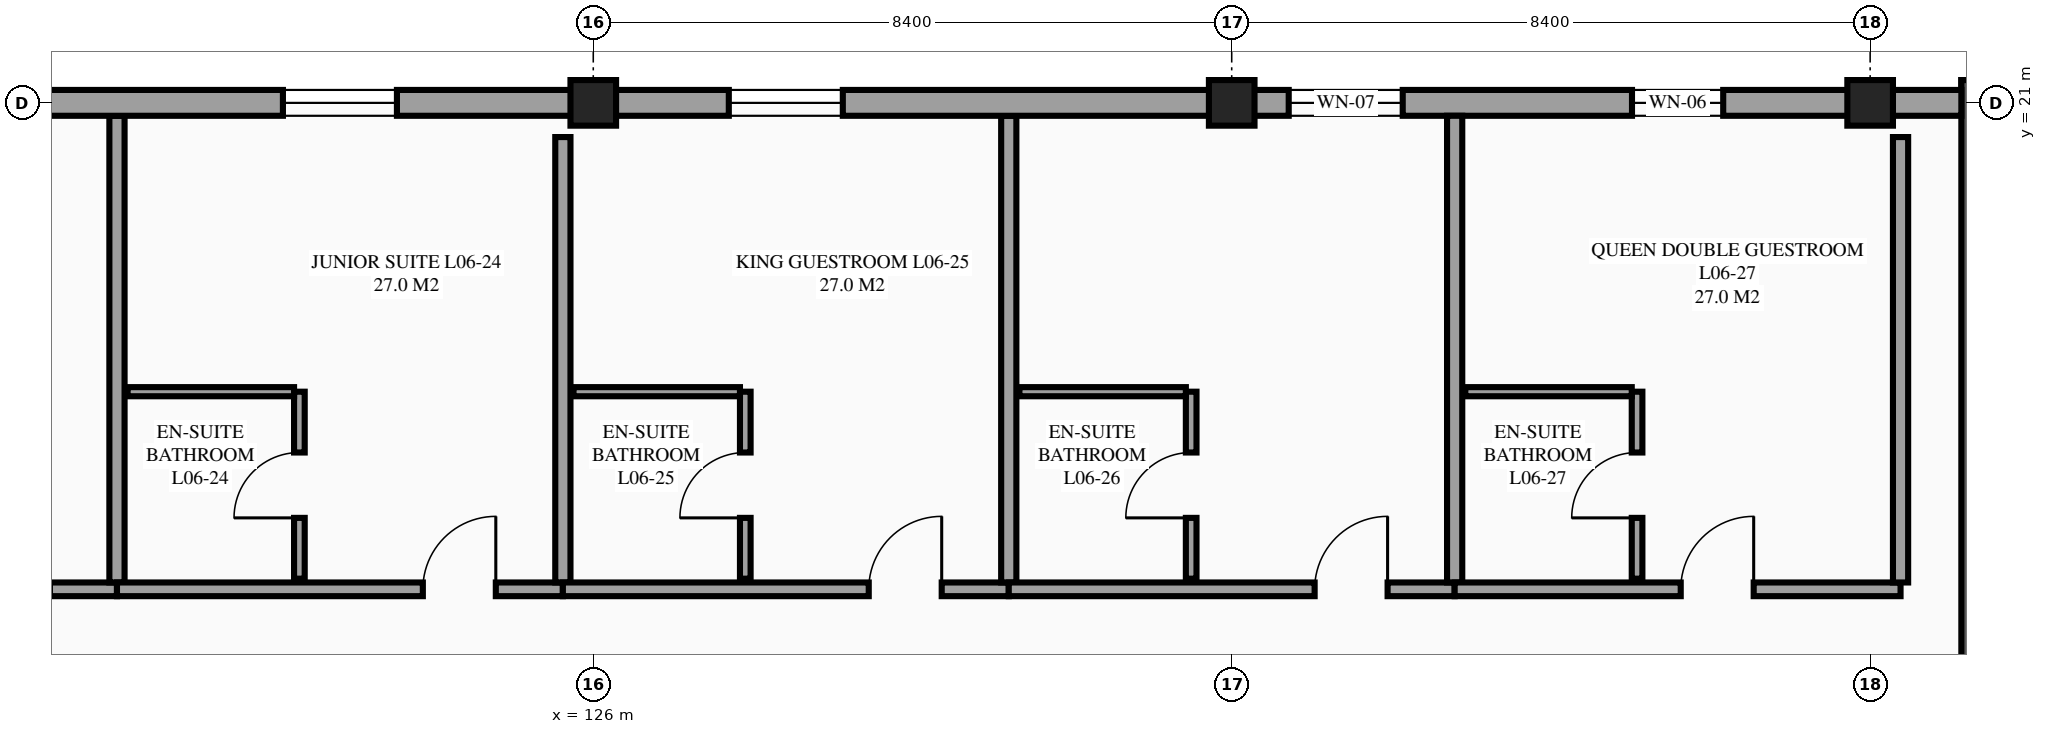
"""IFC4 building model, lengths in metres.
Left out: names, types, materials, properties, quantities, classifications, styles, units other than length and angle.
Written with IfcOpenShell. Run it as: python <this file> out.ifc"""

import sys

from ifc_helpers import new_model, si_unit, direction, frame, frame_2d, origin, origin_2d, place, context, subcontext, project, spatial, rectangle, extrude, element, fill, save


model = new_model("IFC4")
c1 = context("Model", 3, precision=1e-05, world=origin(), true_north=direction((0.0, 1.0)))
c2 = subcontext(c1, "Body", "Model", "MODEL_VIEW")
j1 = project(units=[si_unit("LENGTHUNIT", "METRE"), si_unit("PLANEANGLEUNIT", "RADIAN")], contexts=[c1])
p1 = place(None, origin())
s1 = spatial("IfcSite", under=j1, at=p1, CompositionType="ELEMENT")
p2 = place(p1, origin())
s2 = spatial("IfcBuilding", under=s1, at=p2, CompositionType="ELEMENT")
p3 = place(p2, frame((0.0, 0.0, 25.5)))
s3 = spatial("IfcBuildingStorey", under=s2, at=p3, CompositionType="ELEMENT", Elevation=25.5)
for number, where, z_axis, x_axis in (
    (1, (126.0, 21.0, 0.0), (0.0, 0.0, 1.0), (1.0, 0.0, 0.0)),
    (2, (134.4, 21.0, 0.0), (0.0, 0.0, 1.0), (1.0, 0.0, 0.0)),
    (3, (142.8, 21.0, 0.0), (0.0, 0.0, 1.0), (1.0, 0.0, 0.0)),
):
    element("IfcColumn", number, at=place(p3, frame(where, z_axis=z_axis, x_axis=x_axis)), inside=s3, PredefinedType="COLUMN", context=c2, shape_type="SweptSolid", body=[
        extrude(rectangle(XDim=0.6, YDim=0.6, at=origin_2d()), origin(), (0.0, 0.0, 1.0), 3.6),
    ])
p4 = place(p3, frame((142.8, 21.0, 0.0), z_axis=(0.0, 0.0, 1.0), x_axis=(-1.0, 0.0, 0.0)))
e4 = element("IfcWall", 4, at=p4, inside=s3, PredefinedType="STANDARD", context=c2, shape_type="SweptSolid", body=[
    extrude(rectangle(XDim=8.4, YDim=0.34, at=frame_2d((4.2, 0.0))), origin(), (0.0, 0.0, 1.0), 2.43),
])
p5 = place(p4, frame((6.15, 0.0, 0.85)))
e5 = element("IfcOpeningElement", 5, at=p5, cuts=e4, PredefinedType="OPENING", context=c2, shape_type="SweptSolid", body=[
    extrude(rectangle(XDim=1.5, YDim=1.5, at=frame_2d((0.75, 0.75))), frame((0.0, 0.18, 0.0), z_axis=(0.0, -1.0, 0.0), x_axis=(1.0, 0.0, 0.0)), (0.0, 0.0, 1.0), 0.36),
])
p6 = place(p4, frame((1.933, 0.0, 0.85)))
e6 = element("IfcOpeningElement", 6, at=p6, cuts=e4, PredefinedType="OPENING", context=c2, shape_type="SweptSolid", body=[
    extrude(rectangle(XDim=1.2, YDim=1.5, at=frame_2d((0.6, 0.75))), frame((0.0, 0.18, 0.0), z_axis=(0.0, -1.0, 0.0), x_axis=(1.0, 0.0, 0.0)), (0.0, 0.0, 1.0), 0.36),
])
p7 = place(p3, frame((149.2, 21.15, 0.0), z_axis=(0.0, 0.0, 1.0), x_axis=(-1.0, 0.0, 0.0)))
e7 = element("IfcWall", 7, at=p7, inside=s3, PredefinedType="SHEAR", context=c2, shape_type="SweptSolid", body=[
    extrude(rectangle(XDim=5.2, YDim=0.3, at=frame_2d((2.6, 0.0))), origin(), (0.0, 0.0, 1.0), 3.6),
])
p8 = place(p3, frame((144.15, 21.3, 0.0), z_axis=(0.0, 0.0, 1.0), x_axis=(0.0, -1.0, 0.0)))
e8 = element("IfcWall", 8, at=p8, inside=s3, PredefinedType="SHEAR", context=c2, shape_type="SweptSolid", body=[
    extrude(rectangle(XDim=8.84, YDim=0.3, at=frame_2d((4.42, 0.0))), origin(), (0.0, 0.0, 1.0), 3.6),
])
p9 = place(p3, frame((113.867, 14.6, 0.0), z_axis=(0.0, 0.0, 1.0), x_axis=(1.0, 0.0, 0.0)))
e9 = element("IfcWall", 9, at=p9, inside=s3, PredefinedType="PARTITIONING", context=c2, shape_type="SweptSolid", body=[
    extrude(rectangle(XDim=5.867, YDim=0.18, at=frame_2d((2.933, 0.0))), origin(), (0.0, 0.0, 1.0), 3.375),
])
p10 = place(p9, frame((4.024, 0.0, 0.0)))
e10 = element("IfcOpeningElement", 10, at=p10, cuts=e9, PredefinedType="OPENING", context=c2, shape_type="SweptSolid", body=[
    extrude(rectangle(XDim=0.96, YDim=2.15, at=frame_2d((0.48, 1.075))), frame((0.0, 0.1, 0.0), z_axis=(0.0, -1.0, 0.0), x_axis=(1.0, 0.0, 0.0)), (0.0, 0.0, 1.0), 0.2),
])
p11 = place(p3, frame((119.733, 14.69, 0.0), z_axis=(0.0, 0.0, 1.0), x_axis=(0.0, 1.0, 0.0)))
e11 = element("IfcWall", 11, at=p11, inside=s3, PredefinedType="PARTITIONING", context=c2, shape_type="SweptSolid", body=[
    extrude(rectangle(XDim=6.14, YDim=0.2, at=frame_2d((3.07, 0.0))), origin(), (0.0, 0.0, 1.0), 3.375),
])
p12 = place(p3, frame((119.733, 14.6, 0.0), z_axis=(0.0, 0.0, 1.0), x_axis=(1.0, 0.0, 0.0)))
e12 = element("IfcWall", 12, at=p12, inside=s3, PredefinedType="PARTITIONING", context=c2, shape_type="SweptSolid", body=[
    extrude(rectangle(XDim=5.867, YDim=0.18, at=frame_2d((2.933, 0.0))), origin(), (0.0, 0.0, 1.0), 3.375),
])
p13 = place(p12, frame((4.024, 0.0, 0.0)))
e13 = element("IfcOpeningElement", 13, at=p13, cuts=e12, PredefinedType="OPENING", context=c2, shape_type="SweptSolid", body=[
    extrude(rectangle(XDim=0.96, YDim=2.15, at=frame_2d((0.48, 1.075))), frame((0.0, 0.1, 0.0), z_axis=(0.0, -1.0, 0.0), x_axis=(1.0, 0.0, 0.0)), (0.0, 0.0, 1.0), 0.2),
])
p14 = place(p3, frame((125.6, 14.69, 0.0), z_axis=(0.0, 0.0, 1.0), x_axis=(0.0, 1.0, 0.0)))
e14 = element("IfcWall", 14, at=p14, inside=s3, PredefinedType="PARTITIONING", context=c2, shape_type="SweptSolid", body=[
    extrude(rectangle(XDim=5.86, YDim=0.2, at=frame_2d((2.93, 0.0))), origin(), (0.0, 0.0, 1.0), 3.375),
])
p15 = place(p3, frame((122.133, 14.74, 0.0), z_axis=(0.0, 0.0, 1.0), x_axis=(0.0, 1.0, 0.0)))
e15 = element("IfcWall", 15, at=p15, inside=s3, PredefinedType="PARTITIONING", context=c2, shape_type="SweptSolid", body=[
    extrude(rectangle(XDim=2.46, YDim=0.14, at=frame_2d((1.23, 0.0))), origin(), (0.0, 0.0, 1.0), 3.375),
])
p16 = place(p15, frame((0.8, 0.0, 0.0)))
e16 = element("IfcOpeningElement", 16, at=p16, cuts=e15, PredefinedType="OPENING", context=c2, shape_type="SweptSolid", body=[
    extrude(rectangle(XDim=0.86, YDim=2.1, at=frame_2d((0.43, 1.05))), frame((0.0, 0.08, 0.0), z_axis=(0.0, -1.0, 0.0), x_axis=(1.0, 0.0, 0.0)), (0.0, 0.0, 1.0), 0.16),
])
p17 = place(p3, frame((119.873, 17.2, 0.0), z_axis=(0.0, 0.0, 1.0), x_axis=(1.0, 0.0, 0.0)))
e17 = element("IfcWall", 17, at=p17, inside=s3, PredefinedType="PARTITIONING", context=c2, shape_type="SweptSolid", body=[
    extrude(rectangle(XDim=2.19, YDim=0.12, at=frame_2d((1.095, 0.0))), origin(), (0.0, 0.0, 1.0), 3.375),
])
p18 = place(p3, frame((125.6, 14.6, 0.0), z_axis=(0.0, 0.0, 1.0), x_axis=(1.0, 0.0, 0.0)))
e18 = element("IfcWall", 18, at=p18, inside=s3, PredefinedType="PARTITIONING", context=c2, shape_type="SweptSolid", body=[
    extrude(rectangle(XDim=5.867, YDim=0.18, at=frame_2d((2.933, 0.0))), origin(), (0.0, 0.0, 1.0), 3.375),
])
p19 = place(p18, frame((4.024, 0.0, 0.0)))
e19 = element("IfcOpeningElement", 19, at=p19, cuts=e18, PredefinedType="OPENING", context=c2, shape_type="SweptSolid", body=[
    extrude(rectangle(XDim=0.96, YDim=2.15, at=frame_2d((0.48, 1.075))), frame((0.0, 0.1, 0.0), z_axis=(0.0, -1.0, 0.0), x_axis=(1.0, 0.0, 0.0)), (0.0, 0.0, 1.0), 0.2),
])
p20 = place(p3, frame((131.467, 14.69, 0.0), z_axis=(0.0, 0.0, 1.0), x_axis=(0.0, 1.0, 0.0)))
e20 = element("IfcWall", 20, at=p20, inside=s3, PredefinedType="PARTITIONING", context=c2, shape_type="SweptSolid", body=[
    extrude(rectangle(XDim=6.14, YDim=0.2, at=frame_2d((3.07, 0.0))), origin(), (0.0, 0.0, 1.0), 3.375),
])
p21 = place(p3, frame((128.0, 14.74, 0.0), z_axis=(0.0, 0.0, 1.0), x_axis=(0.0, 1.0, 0.0)))
e21 = element("IfcWall", 21, at=p21, inside=s3, PredefinedType="PARTITIONING", context=c2, shape_type="SweptSolid", body=[
    extrude(rectangle(XDim=2.46, YDim=0.14, at=frame_2d((1.23, 0.0))), origin(), (0.0, 0.0, 1.0), 3.375),
])
p22 = place(p21, frame((0.8, 0.0, 0.0)))
e22 = element("IfcOpeningElement", 22, at=p22, cuts=e21, PredefinedType="OPENING", context=c2, shape_type="SweptSolid", body=[
    extrude(rectangle(XDim=0.86, YDim=2.1, at=frame_2d((0.43, 1.05))), frame((0.0, 0.08, 0.0), z_axis=(0.0, -1.0, 0.0), x_axis=(1.0, 0.0, 0.0)), (0.0, 0.0, 1.0), 0.16),
])
p23 = place(p3, frame((125.74, 17.2, 0.0), z_axis=(0.0, 0.0, 1.0), x_axis=(1.0, 0.0, 0.0)))
e23 = element("IfcWall", 23, at=p23, inside=s3, PredefinedType="PARTITIONING", context=c2, shape_type="SweptSolid", body=[
    extrude(rectangle(XDim=2.19, YDim=0.12, at=frame_2d((1.095, 0.0))), origin(), (0.0, 0.0, 1.0), 3.375),
])
p24 = place(p3, frame((131.467, 14.6, 0.0), z_axis=(0.0, 0.0, 1.0), x_axis=(1.0, 0.0, 0.0)))
e24 = element("IfcWall", 24, at=p24, inside=s3, PredefinedType="PARTITIONING", context=c2, shape_type="SweptSolid", body=[
    extrude(rectangle(XDim=5.866, YDim=0.18, at=frame_2d((2.933, 0.0))), origin(), (0.0, 0.0, 1.0), 3.375),
])
p25 = place(p24, frame((4.024, 0.0, 0.0)))
e25 = element("IfcOpeningElement", 25, at=p25, cuts=e24, PredefinedType="OPENING", context=c2, shape_type="SweptSolid", body=[
    extrude(rectangle(XDim=0.96, YDim=2.15, at=frame_2d((0.48, 1.075))), frame((0.0, 0.1, 0.0), z_axis=(0.0, -1.0, 0.0), x_axis=(1.0, 0.0, 0.0)), (0.0, 0.0, 1.0), 0.2),
])
p26 = place(p3, frame((137.333, 14.69, 0.0), z_axis=(0.0, 0.0, 1.0), x_axis=(0.0, 1.0, 0.0)))
e26 = element("IfcWall", 26, at=p26, inside=s3, PredefinedType="PARTITIONING", context=c2, shape_type="SweptSolid", body=[
    extrude(rectangle(XDim=6.14, YDim=0.2, at=frame_2d((3.07, 0.0))), origin(), (0.0, 0.0, 1.0), 3.375),
])
p27 = place(p3, frame((133.867, 14.74, 0.0), z_axis=(0.0, 0.0, 1.0), x_axis=(0.0, 1.0, 0.0)))
e27 = element("IfcWall", 27, at=p27, inside=s3, PredefinedType="PARTITIONING", context=c2, shape_type="SweptSolid", body=[
    extrude(rectangle(XDim=2.46, YDim=0.14, at=frame_2d((1.23, 0.0))), origin(), (0.0, 0.0, 1.0), 3.375),
])
p28 = place(p27, frame((0.8, 0.0, 0.0)))
e28 = element("IfcOpeningElement", 28, at=p28, cuts=e27, PredefinedType="OPENING", context=c2, shape_type="SweptSolid", body=[
    extrude(rectangle(XDim=0.86, YDim=2.1, at=frame_2d((0.43, 1.05))), frame((0.0, 0.08, 0.0), z_axis=(0.0, -1.0, 0.0), x_axis=(1.0, 0.0, 0.0)), (0.0, 0.0, 1.0), 0.16),
])
p29 = place(p3, frame((131.607, 17.2, 0.0), z_axis=(0.0, 0.0, 1.0), x_axis=(1.0, 0.0, 0.0)))
e29 = element("IfcWall", 29, at=p29, inside=s3, PredefinedType="PARTITIONING", context=c2, shape_type="SweptSolid", body=[
    extrude(rectangle(XDim=2.19, YDim=0.12, at=frame_2d((1.095, 0.0))), origin(), (0.0, 0.0, 1.0), 3.375),
])
p30 = place(p3, frame((137.333, 14.6, 0.0), z_axis=(0.0, 0.0, 1.0), x_axis=(1.0, 0.0, 0.0)))
e30 = element("IfcWall", 30, at=p30, inside=s3, PredefinedType="PARTITIONING", context=c2, shape_type="SweptSolid", body=[
    extrude(rectangle(XDim=5.867, YDim=0.18, at=frame_2d((2.933, 0.0))), origin(), (0.0, 0.0, 1.0), 3.375),
])
p31 = place(p30, frame((2.974, 0.0, 0.0)))
e31 = element("IfcOpeningElement", 31, at=p31, cuts=e30, PredefinedType="OPENING", context=c2, shape_type="SweptSolid", body=[
    extrude(rectangle(XDim=0.96, YDim=2.15, at=frame_2d((0.48, 1.075))), frame((0.0, 0.1, 0.0), z_axis=(0.0, -1.0, 0.0), x_axis=(1.0, 0.0, 0.0)), (0.0, 0.0, 1.0), 0.2),
])
p32 = place(p3, frame((143.2, 14.69, 0.0), z_axis=(0.0, 0.0, 1.0), x_axis=(0.0, 1.0, 0.0)))
e32 = element("IfcWall", 32, at=p32, inside=s3, PredefinedType="PARTITIONING", context=c2, shape_type="SweptSolid", body=[
    extrude(rectangle(XDim=5.86, YDim=0.2, at=frame_2d((2.93, 0.0))), origin(), (0.0, 0.0, 1.0), 3.375),
])
p33 = place(p3, frame((139.733, 14.74, 0.0), z_axis=(0.0, 0.0, 1.0), x_axis=(0.0, 1.0, 0.0)))
e33 = element("IfcWall", 33, at=p33, inside=s3, PredefinedType="PARTITIONING", context=c2, shape_type="SweptSolid", body=[
    extrude(rectangle(XDim=2.46, YDim=0.14, at=frame_2d((1.23, 0.0))), origin(), (0.0, 0.0, 1.0), 3.375),
])
p34 = place(p33, frame((0.8, 0.0, 0.0)))
e34 = element("IfcOpeningElement", 34, at=p34, cuts=e33, PredefinedType="OPENING", context=c2, shape_type="SweptSolid", body=[
    extrude(rectangle(XDim=0.86, YDim=2.1, at=frame_2d((0.43, 1.05))), frame((0.0, 0.08, 0.0), z_axis=(0.0, -1.0, 0.0), x_axis=(1.0, 0.0, 0.0)), (0.0, 0.0, 1.0), 0.16),
])
p35 = place(p3, frame((137.473, 17.2, 0.0), z_axis=(0.0, 0.0, 1.0), x_axis=(1.0, 0.0, 0.0)))
e35 = element("IfcWall", 35, at=p35, inside=s3, PredefinedType="PARTITIONING", context=c2, shape_type="SweptSolid", body=[
    extrude(rectangle(XDim=2.19, YDim=0.12, at=frame_2d((1.095, 0.0))), origin(), (0.0, 0.0, 1.0), 3.375),
])
p36 = place(p3, frame((144.0, 21.0, 0.0), z_axis=(0.0, 0.0, 1.0), x_axis=(-1.0, 0.0, 0.0)))
e36 = element("IfcWall", 36, at=p36, inside=s3, PredefinedType="STANDARD", context=c2, shape_type="SweptSolid", body=[
    extrude(rectangle(XDim=1.2, YDim=0.34, at=frame_2d((0.6, 0.0))), origin(), (0.0, 0.0, 1.0), 3.07),
])
p37 = place(p3, frame((134.4, 21.0, 0.0), z_axis=(0.0, 0.0, 1.0), x_axis=(-1.0, 0.0, 0.0)))
e37 = element("IfcWall", 37, at=p37, inside=s3, PredefinedType="STANDARD", context=c2, shape_type="SweptSolid", body=[
    extrude(rectangle(XDim=8.4, YDim=0.34, at=frame_2d((4.2, 0.0))), origin(), (0.0, 0.0, 1.0), 2.78),
])
p38 = place(p37, frame((5.117, 0.0, 0.85)))
e38 = element("IfcOpeningElement", 38, at=p38, cuts=e37, PredefinedType="OPENING", context=c2, shape_type="SweptSolid", body=[
    extrude(rectangle(XDim=1.5, YDim=1.5, at=frame_2d((0.75, 0.75))), frame((0.0, 0.18, 0.0), z_axis=(0.0, -1.0, 0.0), x_axis=(1.0, 0.0, 0.0)), (0.0, 0.0, 1.0), 0.36),
])
p39 = place(p3, frame((126.0, 21.0, 0.0), z_axis=(0.0, 0.0, 1.0), x_axis=(-1.0, 0.0, 0.0)))
e39 = element("IfcWall", 39, at=p39, inside=s3, PredefinedType="STANDARD", context=c2, shape_type="SweptSolid", body=[
    extrude(rectangle(XDim=8.4, YDim=0.34, at=frame_2d((4.2, 0.0))), origin(), (0.0, 0.0, 1.0), 3.075),
])
p40 = place(p39, frame((2.583, 0.0, 0.85)))
e40 = element("IfcOpeningElement", 40, at=p40, cuts=e39, PredefinedType="OPENING", context=c2, shape_type="SweptSolid", body=[
    extrude(rectangle(XDim=1.5, YDim=1.5, at=frame_2d((0.75, 0.75))), frame((0.0, 0.18, 0.0), z_axis=(0.0, -1.0, 0.0), x_axis=(1.0, 0.0, 0.0)), (0.0, 0.0, 1.0), 0.36),
])
p41 = place(p40, origin())
e41 = element("IfcWindow", 41, at=p41, inside=s3, PartitioningType="SINGLE_PANEL", PredefinedType="WINDOW", context=c2, shape_type="SweptSolid", body=[
    extrude(rectangle(XDim=1.5, YDim=1.5, at=frame_2d((0.75, 0.75))), frame((0.0, 0.03, 0.0), z_axis=(0.0, -1.0, 0.0), x_axis=(1.0, 0.0, 0.0)), (0.0, 0.0, 1.0), 0.06),
])
fill(e40, e41)
p42 = place(p38, origin())
e42 = element("IfcWindow", 42, at=p42, inside=s3, PartitioningType="SINGLE_PANEL", PredefinedType="WINDOW", context=c2, shape_type="SweptSolid", body=[
    extrude(rectangle(XDim=1.5, YDim=1.5, at=frame_2d((0.75, 0.75))), frame((0.0, 0.03, 0.0), z_axis=(0.0, -1.0, 0.0), x_axis=(1.0, 0.0, 0.0)), (0.0, 0.0, 1.0), 0.06),
])
fill(e38, e42)
p43 = place(p5, origin())
e43 = element("IfcWindow", 43, at=p43, inside=s3, PartitioningType="SINGLE_PANEL", PredefinedType="WINDOW", context=c2, shape_type="SweptSolid", body=[
    extrude(rectangle(XDim=1.5, YDim=1.5, at=frame_2d((0.75, 0.75))), frame((0.0, 0.03, 0.0), z_axis=(0.0, -1.0, 0.0), x_axis=(1.0, 0.0, 0.0)), (0.0, 0.0, 1.0), 0.06),
])
fill(e5, e43)
p44 = place(p6, origin())
e44 = element("IfcWindow", 44, at=p44, inside=s3, PartitioningType="SINGLE_PANEL", PredefinedType="WINDOW", context=c2, shape_type="SweptSolid", body=[
    extrude(rectangle(XDim=1.2, YDim=1.5, at=frame_2d((0.6, 0.75))), frame((0.0, 0.03, 0.0), z_axis=(0.0, -1.0, 0.0), x_axis=(1.0, 0.0, 0.0)), (0.0, 0.0, 1.0), 0.06),
])
fill(e6, e44)
p45 = place(p13, origin())
e45 = element("IfcDoor", 45, at=p45, inside=s3, OperationType="SINGLE_SWING_RIGHT", PredefinedType="DOOR", context=c2, shape_type="SweptSolid", body=[
    extrude(rectangle(XDim=0.96, YDim=2.15, at=frame_2d((0.48, 1.075))), frame((0.0, 0.025, 0.0), z_axis=(0.0, -1.0, 0.0), x_axis=(1.0, 0.0, 0.0)), (0.0, 0.0, 1.0), 0.05),
])
fill(e13, e45)
p46 = place(p16, origin())
e46 = element("IfcDoor", 46, at=p46, inside=s3, OperationType="SINGLE_SWING_LEFT", PredefinedType="DOOR", context=c2, shape_type="SweptSolid", body=[
    extrude(rectangle(XDim=0.86, YDim=2.1, at=frame_2d((0.43, 1.05))), frame((0.0, 0.025, 0.0), z_axis=(0.0, -1.0, 0.0), x_axis=(1.0, 0.0, 0.0)), (0.0, 0.0, 1.0), 0.05),
])
fill(e16, e46)
p47 = place(p19, origin())
e47 = element("IfcDoor", 47, at=p47, inside=s3, OperationType="SINGLE_SWING_RIGHT", PredefinedType="DOOR", context=c2, shape_type="SweptSolid", body=[
    extrude(rectangle(XDim=0.96, YDim=2.15, at=frame_2d((0.48, 1.075))), frame((0.0, 0.025, 0.0), z_axis=(0.0, -1.0, 0.0), x_axis=(1.0, 0.0, 0.0)), (0.0, 0.0, 1.0), 0.05),
])
fill(e19, e47)
p48 = place(p22, origin())
e48 = element("IfcDoor", 48, at=p48, inside=s3, OperationType="SINGLE_SWING_LEFT", PredefinedType="DOOR", context=c2, shape_type="SweptSolid", body=[
    extrude(rectangle(XDim=0.86, YDim=2.1, at=frame_2d((0.43, 1.05))), frame((0.0, 0.025, 0.0), z_axis=(0.0, -1.0, 0.0), x_axis=(1.0, 0.0, 0.0)), (0.0, 0.0, 1.0), 0.05),
])
fill(e22, e48)
p49 = place(p25, origin())
e49 = element("IfcDoor", 49, at=p49, inside=s3, OperationType="SINGLE_SWING_RIGHT", PredefinedType="DOOR", context=c2, shape_type="SweptSolid", body=[
    extrude(rectangle(XDim=0.96, YDim=2.15, at=frame_2d((0.48, 1.075))), frame((0.0, 0.025, 0.0), z_axis=(0.0, -1.0, 0.0), x_axis=(1.0, 0.0, 0.0)), (0.0, 0.0, 1.0), 0.05),
])
fill(e25, e49)
p50 = place(p28, origin())
e50 = element("IfcDoor", 50, at=p50, inside=s3, OperationType="SINGLE_SWING_LEFT", PredefinedType="DOOR", context=c2, shape_type="SweptSolid", body=[
    extrude(rectangle(XDim=0.86, YDim=2.1, at=frame_2d((0.43, 1.05))), frame((0.0, 0.025, 0.0), z_axis=(0.0, -1.0, 0.0), x_axis=(1.0, 0.0, 0.0)), (0.0, 0.0, 1.0), 0.05),
])
fill(e28, e50)
p51 = place(p31, origin())
e51 = element("IfcDoor", 51, at=p51, inside=s3, OperationType="SINGLE_SWING_RIGHT", PredefinedType="DOOR", context=c2, shape_type="SweptSolid", body=[
    extrude(rectangle(XDim=0.96, YDim=2.15, at=frame_2d((0.48, 1.075))), frame((0.0, 0.025, 0.0), z_axis=(0.0, -1.0, 0.0), x_axis=(1.0, 0.0, 0.0)), (0.0, 0.0, 1.0), 0.05),
])
fill(e31, e51)
p52 = place(p34, origin())
e52 = element("IfcDoor", 52, at=p52, inside=s3, OperationType="SINGLE_SWING_LEFT", PredefinedType="DOOR", context=c2, shape_type="SweptSolid", body=[
    extrude(rectangle(XDim=0.86, YDim=2.1, at=frame_2d((0.43, 1.05))), frame((0.0, 0.025, 0.0), z_axis=(0.0, -1.0, 0.0), x_axis=(1.0, 0.0, 0.0)), (0.0, 0.0, 1.0), 0.05),
])
fill(e34, e52)
save(model, sys.argv[1])
